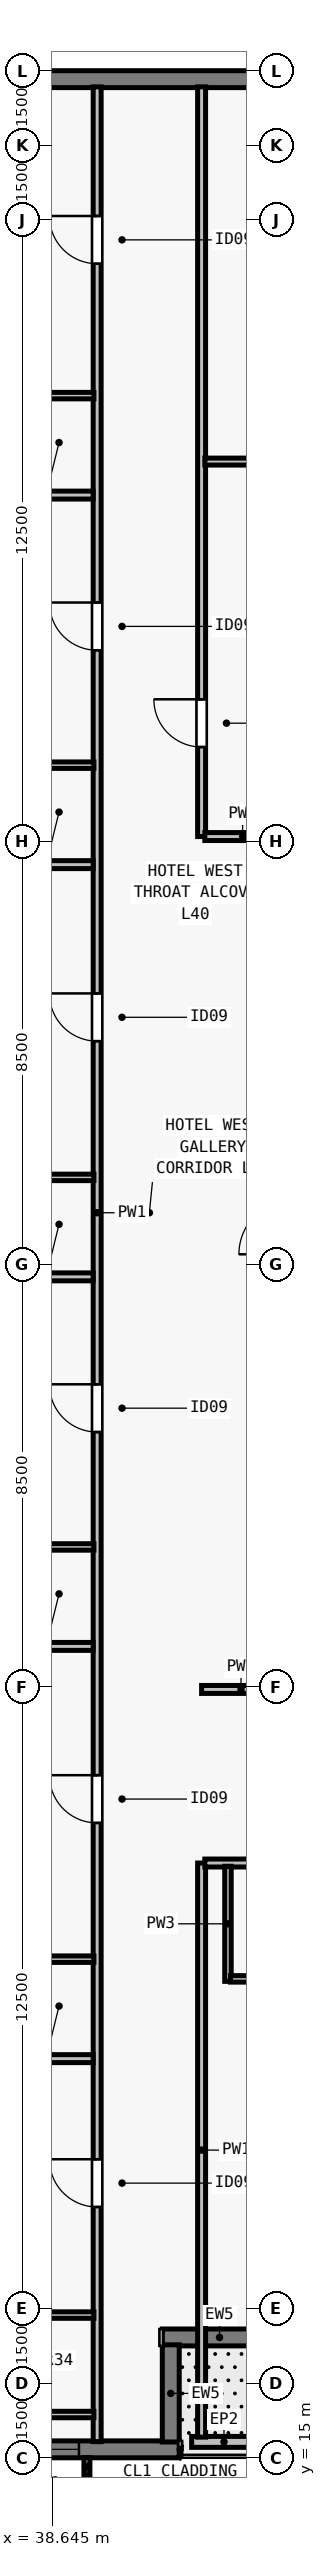
"""IFC4 building model, lengths in metres.
Left out: names, types, materials, properties, quantities, classifications, styles, units other than length and angle.
Written with IfcOpenShell. Run it as: python <this file> out.ifc"""

import sys

from ifc_helpers import new_model, si_unit, direction, frame, frame_2d, origin, place, context, subcontext, project, spatial, rectangle, extrude, element, fill, save


model = new_model("IFC4")
c1 = context("Model", 3, precision=1e-05, world=origin(), true_north=direction((0.0, 1.0)))
c2 = subcontext(c1, "Body", "Model", "MODEL_VIEW")
j1 = project(units=[si_unit("LENGTHUNIT", "METRE"), si_unit("PLANEANGLEUNIT", "RADIAN")], contexts=[c1])
p1 = place(None, origin())
s1 = spatial("IfcSite", under=j1, at=p1, CompositionType="ELEMENT")
p2 = place(p1, origin())
s2 = spatial("IfcBuilding", under=s1, at=p2, CompositionType="ELEMENT")
p3 = place(p2, frame((0.0, 0.0, 148.0)))
s3 = spatial("IfcBuildingStorey", under=s2, at=p3, CompositionType="ELEMENT", Elevation=148.0)
p4 = place(p3, frame((41.2, 15.17, 0.0), z_axis=(0.0, 0.0, 1.0), x_axis=(-1.0, 0.0, 0.0)))
e1 = element("IfcWall", 1, at=p4, inside=s3, PredefinedType="SOLIDWALL", context=c2, shape_type="SweptSolid", body=[
    extrude(rectangle(XDim=8.882, YDim=0.34, at=frame_2d((4.441, 0.0))), origin(), (0.0, 0.0, 1.0), 3.28),
])
p5 = place(p4, frame((2.016, 0.0, 0.8)))
e2 = element("IfcOpeningElement", 2, at=p5, cuts=e1, PredefinedType="OPENING", context=c2, shape_type="SweptSolid", body=[
    extrude(rectangle(XDim=1.35, YDim=1.66, at=frame_2d((0.675, 0.83))), frame((0.0, 0.18, 0.0), z_axis=(0.0, -1.0, 0.0), x_axis=(1.0, 0.0, 0.0)), (0.0, 0.0, 1.0), 0.36),
])
p6 = place(p3, frame((32.0, 62.83, 0.0), z_axis=(0.0, 0.0, 1.0), x_axis=(1.0, 0.0, 0.0)))
e3 = element("IfcWall", 3, at=p6, inside=s3, PredefinedType="SOLIDWALL", context=c2, shape_type="SweptSolid", body=[
    extrude(rectangle(XDim=39.682, YDim=0.34, at=frame_2d((19.841, 0.0))), origin(), (0.0, 0.0, 1.0), 3.28),
])
p7 = place(p6, frame((4.952, 0.0, 0.8)))
e4 = element("IfcOpeningElement", 4, at=p7, cuts=e3, PredefinedType="OPENING", context=c2, shape_type="SweptSolid", body=[
    extrude(rectangle(XDim=1.35, YDim=1.66, at=frame_2d((0.675, 0.83))), frame((0.0, 0.18, 0.0), z_axis=(0.0, -1.0, 0.0), x_axis=(1.0, 0.0, 0.0)), (0.0, 0.0, 1.0), 0.36),
])
p8 = place(p6, frame((12.059, 0.0, 0.8)))
e5 = element("IfcOpeningElement", 5, at=p8, cuts=e3, PredefinedType="OPENING", context=c2, shape_type="SweptSolid", body=[
    extrude(rectangle(XDim=1.35, YDim=1.66, at=frame_2d((0.675, 0.83))), frame((0.0, 0.18, 0.0), z_axis=(0.0, -1.0, 0.0), x_axis=(1.0, 0.0, 0.0)), (0.0, 0.0, 1.0), 0.36),
])
p9 = place(p6, frame((16.262, 0.0, 0.8)))
e6 = element("IfcOpeningElement", 6, at=p9, cuts=e3, PredefinedType="OPENING", context=c2, shape_type="SweptSolid", body=[
    extrude(rectangle(XDim=1.75, YDim=1.66, at=frame_2d((0.875, 0.83))), frame((0.0, 0.18, 0.0), z_axis=(0.0, -1.0, 0.0), x_axis=(1.0, 0.0, 0.0)), (0.0, 0.0, 1.0), 0.36),
])
p10 = place(p6, frame((18.316, 0.0, 0.8)))
e7 = element("IfcOpeningElement", 7, at=p10, cuts=e3, PredefinedType="OPENING", context=c2, shape_type="SweptSolid", body=[
    extrude(rectangle(XDim=1.35, YDim=1.66, at=frame_2d((0.675, 0.83))), frame((0.0, 0.18, 0.0), z_axis=(0.0, -1.0, 0.0), x_axis=(1.0, 0.0, 0.0)), (0.0, 0.0, 1.0), 0.36),
])
p11 = place(p6, frame((22.07, 0.0, 0.8)))
e8 = element("IfcOpeningElement", 8, at=p11, cuts=e3, PredefinedType="OPENING", context=c2, shape_type="SweptSolid", body=[
    extrude(rectangle(XDim=1.75, YDim=1.66, at=frame_2d((0.875, 0.83))), frame((0.0, 0.18, 0.0), z_axis=(0.0, -1.0, 0.0), x_axis=(1.0, 0.0, 0.0)), (0.0, 0.0, 1.0), 0.36),
])
p12 = place(p6, frame((26.273, 0.0, 0.8)))
e9 = element("IfcOpeningElement", 9, at=p12, cuts=e3, PredefinedType="OPENING", context=c2, shape_type="SweptSolid", body=[
    extrude(rectangle(XDim=1.35, YDim=1.66, at=frame_2d((0.675, 0.83))), frame((0.0, 0.18, 0.0), z_axis=(0.0, -1.0, 0.0), x_axis=(1.0, 0.0, 0.0)), (0.0, 0.0, 1.0), 0.36),
])
p13 = place(p6, frame((29.627, 0.0, 0.8)))
e10 = element("IfcOpeningElement", 10, at=p13, cuts=e3, PredefinedType="OPENING", context=c2, shape_type="SweptSolid", body=[
    extrude(rectangle(XDim=1.75, YDim=1.66, at=frame_2d((0.875, 0.83))), frame((0.0, 0.18, 0.0), z_axis=(0.0, -1.0, 0.0), x_axis=(1.0, 0.0, 0.0)), (0.0, 0.0, 1.0), 0.36),
])
p14 = place(p3, frame((46.622, 17.42, 0.0), z_axis=(0.0, 0.0, 1.0), x_axis=(-1.0, 0.0, 0.0)))
e11 = element("IfcWall", 11, at=p14, inside=s3, PredefinedType="SOLIDWALL", context=c2, shape_type="SweptSolid", body=[
    extrude(rectangle(XDim=5.762, YDim=0.34, at=frame_2d((2.881, 0.0))), origin(), (0.0, 0.0, 1.0), 3.28),
])
p15 = place(p14, frame((2.311, 0.0, 0.0)))
e12 = element("IfcOpeningElement", 12, at=p15, cuts=e11, PredefinedType="OPENING", context=c2, shape_type="SweptSolid", body=[
    extrude(rectangle(XDim=1.0, YDim=2.15, at=frame_2d((0.5, 1.075))), frame((0.0, 0.18, 0.0), z_axis=(0.0, -1.0, 0.0), x_axis=(1.0, 0.0, 0.0)), (0.0, 0.0, 1.0), 0.36),
])
p16 = place(p3, frame((41.03, 17.272, 0.0), z_axis=(0.0, 0.0, 1.0), x_axis=(0.0, -1.0, 0.0)))
e13 = element("IfcWall", 13, at=p16, inside=s3, PredefinedType="SOLIDWALL", context=c2, shape_type="SweptSolid", body=[
    extrude(rectangle(XDim=1.954, YDim=0.34, at=frame_2d((0.977, 0.0))), origin(), (0.0, 0.0, 1.0), 3.28),
])
p17 = place(p3, frame((41.45, 15.32, 0.0), z_axis=(0.0, 0.0, 1.0), x_axis=(1.0, 0.0, 0.0)))
e14 = element("IfcWall", 14, at=p17, inside=s3, PredefinedType="PARAPET", context=c2, shape_type="SweptSolid", body=[
    extrude(rectangle(XDim=1.3, YDim=0.22, at=frame_2d((0.65, 0.0))), origin(), (0.0, 0.0, 1.0), 0.55),
])
p18 = place(p3, frame((39.55, 15.325, 0.0), z_axis=(0.0, 0.0, 1.0), x_axis=(0.0, 1.0, 0.0)))
e15 = element("IfcWall", 15, at=p18, inside=s3, PredefinedType="PARTITIONING", context=c2, shape_type="SweptSolid", body=[
    extrude(rectangle(XDim=47.35, YDim=0.16, at=frame_2d((23.675, 0.0))), origin(), (0.0, 0.0, 1.0), 2.555),
])
p19 = place(p18, frame((4.718, 0.0, 0.0)))
e16 = element("IfcOpeningElement", 16, at=p19, cuts=e15, PredefinedType="OPENING", context=c2, shape_type="SweptSolid", body=[
    extrude(rectangle(XDim=0.96, YDim=2.15, at=frame_2d((0.48, 1.075))), frame((0.0, 0.09, 0.0), z_axis=(0.0, -1.0, 0.0), x_axis=(1.0, 0.0, 0.0)), (0.0, 0.0, 1.0), 0.18),
])
p20 = place(p18, frame((12.441, 0.0, 0.0)))
e17 = element("IfcOpeningElement", 17, at=p20, cuts=e15, PredefinedType="OPENING", context=c2, shape_type="SweptSolid", body=[
    extrude(rectangle(XDim=0.96, YDim=2.15, at=frame_2d((0.48, 1.075))), frame((0.0, 0.09, 0.0), z_axis=(0.0, -1.0, 0.0), x_axis=(1.0, 0.0, 0.0)), (0.0, 0.0, 1.0), 0.18),
])
p21 = place(p18, frame((20.301, 0.0, 0.0)))
e18 = element("IfcOpeningElement", 18, at=p21, cuts=e15, PredefinedType="OPENING", context=c2, shape_type="SweptSolid", body=[
    extrude(rectangle(XDim=0.96, YDim=2.15, at=frame_2d((0.48, 1.075))), frame((0.0, 0.09, 0.0), z_axis=(0.0, -1.0, 0.0), x_axis=(1.0, 0.0, 0.0)), (0.0, 0.0, 1.0), 0.18),
])
p22 = place(p18, frame((28.161, 0.0, 0.0)))
e19 = element("IfcOpeningElement", 19, at=p22, cuts=e15, PredefinedType="OPENING", context=c2, shape_type="SweptSolid", body=[
    extrude(rectangle(XDim=0.96, YDim=2.15, at=frame_2d((0.48, 1.075))), frame((0.0, 0.09, 0.0), z_axis=(0.0, -1.0, 0.0), x_axis=(1.0, 0.0, 0.0)), (0.0, 0.0, 1.0), 0.18),
])
p23 = place(p18, frame((36.021, 0.0, 0.0)))
e20 = element("IfcOpeningElement", 20, at=p23, cuts=e15, PredefinedType="OPENING", context=c2, shape_type="SweptSolid", body=[
    extrude(rectangle(XDim=0.96, YDim=2.15, at=frame_2d((0.48, 1.075))), frame((0.0, 0.09, 0.0), z_axis=(0.0, -1.0, 0.0), x_axis=(1.0, 0.0, 0.0)), (0.0, 0.0, 1.0), 0.18),
])
p24 = place(p18, frame((43.793, 0.0, 0.0)))
e21 = element("IfcOpeningElement", 21, at=p24, cuts=e15, PredefinedType="OPENING", context=c2, shape_type="SweptSolid", body=[
    extrude(rectangle(XDim=0.96, YDim=2.15, at=frame_2d((0.48, 1.075))), frame((0.0, 0.09, 0.0), z_axis=(0.0, -1.0, 0.0), x_axis=(1.0, 0.0, 0.0)), (0.0, 0.0, 1.0), 0.18),
])
p25 = place(p3, frame((41.65, 15.415, 0.0), z_axis=(0.0, 0.0, 1.0), x_axis=(0.0, 1.0, 0.0)))
e22 = element("IfcWall", 22, at=p25, inside=s3, PredefinedType="PARTITIONING", context=c2, shape_type="SweptSolid", body=[
    extrude(rectangle(XDim=11.545, YDim=0.16, at=frame_2d((5.772, 0.0))), origin(), (0.0, 0.0, 1.0), 3.28),
])
p26 = place(p3, frame((41.65, 47.6, 0.0), z_axis=(0.0, 0.0, 1.0), x_axis=(0.0, 1.0, 0.0)))
e23 = element("IfcWall", 23, at=p26, inside=s3, PredefinedType="PARTITIONING", context=c2, shape_type="SweptSolid", body=[
    extrude(rectangle(XDim=15.075, YDim=0.16, at=frame_2d((7.538, 0.0))), origin(), (0.0, 0.0, 1.0), 2.555),
])
p27 = place(p26, frame((1.8, 0.0, 0.0)))
e24 = element("IfcOpeningElement", 24, at=p27, cuts=e23, PredefinedType="OPENING", context=c2, shape_type="SweptSolid", body=[
    extrude(rectangle(XDim=0.96, YDim=2.12, at=frame_2d((0.48, 1.06))), frame((0.0, 0.09, 0.0), z_axis=(0.0, -1.0, 0.0), x_axis=(1.0, 0.0, 0.0)), (0.0, 0.0, 1.0), 0.18),
])
p28 = place(p3, frame((41.65, 30.45, 0.0), z_axis=(0.0, 0.0, 1.0), x_axis=(1.0, 0.0, 0.0)))
e25 = element("IfcWall", 25, at=p28, inside=s3, PredefinedType="PARTITIONING", context=c2, shape_type="SweptSolid", body=[
    extrude(rectangle(XDim=1.585, YDim=0.16, at=frame_2d((0.792, 0.0))), origin(), (0.0, 0.0, 1.0), 3.28),
])
p29 = place(p3, frame((41.715, 47.6, 0.0), z_axis=(0.0, 0.0, 1.0), x_axis=(1.0, 0.0, 0.0)))
e26 = element("IfcWall", 26, at=p29, inside=s3, PredefinedType="PARTITIONING", context=c2, shape_type="SweptSolid", body=[
    extrude(rectangle(XDim=1.52, YDim=0.16, at=frame_2d((0.76, 0.0))), origin(), (0.0, 0.0, 1.0), 3.28),
])
p30 = place(p3, frame((41.715, 26.96, 0.0), z_axis=(0.0, 0.0, 1.0), x_axis=(1.0, 0.0, 0.0)))
e27 = element("IfcWall", 27, at=p30, inside=s3, PredefinedType="PARTITIONING", context=c2, shape_type="SweptSolid", body=[
    extrude(rectangle(XDim=22.07, YDim=0.16, at=frame_2d((11.035, 0.0))), origin(), (0.0, 0.0, 1.0), 3.28),
])
p31 = place(p30, frame((6.15, 0.0, 0.0)))
e28 = element("IfcOpeningElement", 28, at=p31, cuts=e27, PredefinedType="OPENING", context=c2, shape_type="SweptSolid", body=[
    extrude(rectangle(XDim=0.96, YDim=2.15, at=frame_2d((0.48, 1.075))), frame((0.0, 0.09, 0.0), z_axis=(0.0, -1.0, 0.0), x_axis=(1.0, 0.0, 0.0)), (0.0, 0.0, 1.0), 0.18),
])
p32 = place(p30, frame((16.945, 0.0, 0.0)))
e29 = element("IfcOpeningElement", 29, at=p32, cuts=e27, PredefinedType="OPENING", context=c2, shape_type="SweptSolid", body=[
    extrude(rectangle(XDim=0.96, YDim=2.15, at=frame_2d((0.48, 1.075))), frame((0.0, 0.09, 0.0), z_axis=(0.0, -1.0, 0.0), x_axis=(1.0, 0.0, 0.0)), (0.0, 0.0, 1.0), 0.18),
])
p33 = place(p3, frame((41.715, 55.14, 0.0), z_axis=(0.0, 0.0, 1.0), x_axis=(1.0, 0.0, 0.0)))
e30 = element("IfcWall", 30, at=p33, inside=s3, PredefinedType="PARTITIONING", context=c2, shape_type="SweptSolid", body=[
    extrude(rectangle(XDim=22.07, YDim=0.14, at=frame_2d((11.035, 0.0))), origin(), (0.0, 0.0, 1.0), 3.28),
])
p34 = place(p33, frame((3.435, 0.0, 0.0)))
e31 = element("IfcOpeningElement", 31, at=p34, cuts=e30, PredefinedType="OPENING", context=c2, shape_type="SweptSolid", body=[
    extrude(rectangle(XDim=0.92, YDim=2.12, at=frame_2d((0.46, 1.06))), frame((0.0, 0.08, 0.0), z_axis=(0.0, -1.0, 0.0), x_axis=(1.0, 0.0, 0.0)), (0.0, 0.0, 1.0), 0.16),
])
p35 = place(p33, frame((14.435, 0.0, 0.0)))
e32 = element("IfcOpeningElement", 32, at=p35, cuts=e30, PredefinedType="OPENING", context=c2, shape_type="SweptSolid", body=[
    extrude(rectangle(XDim=0.92, YDim=2.12, at=frame_2d((0.46, 1.06))), frame((0.0, 0.08, 0.0), z_axis=(0.0, -1.0, 0.0), x_axis=(1.0, 0.0, 0.0)), (0.0, 0.0, 1.0), 0.16),
])
p36 = place(p3, frame((42.18, 24.58, 0.0), z_axis=(0.0, 0.0, 1.0), x_axis=(0.0, 1.0, 0.0)))
e33 = element("IfcWall", 33, at=p36, inside=s3, PredefinedType="PLUMBINGWALL", context=c2, shape_type="SweptSolid", body=[
    extrude(rectangle(XDim=2.315, YDim=0.13, at=frame_2d((1.157, 0.0))), origin(), (0.0, 0.0, 1.0), 3.28),
])
p37 = place(p3, frame((42.23, 24.63, 0.0), z_axis=(0.0, 0.0, 1.0), x_axis=(1.0, 0.0, 0.0)))
e34 = element("IfcWall", 34, at=p37, inside=s3, PredefinedType="PLUMBINGWALL", context=c2, shape_type="SweptSolid", body=[
    extrude(rectangle(XDim=1.9, YDim=0.13, at=frame_2d((0.95, 0.0))), origin(), (0.0, 0.0, 1.0), 3.28),
])
p38 = place(p37, frame((0.54, 0.0, 0.0)))
e35 = element("IfcOpeningElement", 35, at=p38, cuts=e34, PredefinedType="OPENING", context=c2, shape_type="SweptSolid", body=[
    extrude(rectangle(XDim=0.82, YDim=2.1, at=frame_2d((0.41, 1.05))), frame((0.0, 0.075, 0.0), z_axis=(0.0, -1.0, 0.0), x_axis=(1.0, 0.0, 0.0)), (0.0, 0.0, 1.0), 0.15),
])
for number, where, z_axis, x_axis in (
    (36, (37.17, 15.87, 0.0), (0.0, 0.0, 1.0), (1.0, 0.0, 0.0)),
    (37, (37.17, 17.87, 0.0), (0.0, 0.0, 1.0), (1.0, 0.0, 0.0)),
):
    element("IfcWall", number, at=place(p3, frame(where, z_axis=z_axis, x_axis=x_axis)), inside=s3, PredefinedType="PLUMBINGWALL", context=c2, shape_type="SweptSolid", body=[
        extrude(rectangle(XDim=2.315, YDim=0.13, at=frame_2d((1.158, 0.0))), origin(), (0.0, 0.0, 1.0), 3.28),
    ])
p39 = place(p3, frame((28.325, 23.027, 0.0), z_axis=(0.0, 0.0, 1.0), x_axis=(1.0, 0.0, 0.0)))
e38 = element("IfcWall", 38, at=p39, inside=s3, PredefinedType="PARTITIONING", context=c2, shape_type="SweptSolid", body=[
    extrude(rectangle(XDim=11.145, YDim=0.16, at=frame_2d((5.573, 0.0))), origin(), (0.0, 0.0, 1.0), 2.896),
])
p40 = place(p3, frame((37.17, 25.027, 0.0), z_axis=(0.0, 0.0, 1.0), x_axis=(1.0, 0.0, 0.0)))
e39 = element("IfcWall", 39, at=p40, inside=s3, PredefinedType="PLUMBINGWALL", context=c2, shape_type="SweptSolid", body=[
    extrude(rectangle(XDim=2.315, YDim=0.13, at=frame_2d((1.158, 0.0))), origin(), (0.0, 0.0, 1.0), 3.28),
])
p41 = place(p3, frame((28.325, 31.315, 0.0), z_axis=(0.0, 0.0, 1.0), x_axis=(1.0, 0.0, 0.0)))
e40 = element("IfcWall", 40, at=p41, inside=s3, PredefinedType="PARTITIONING", context=c2, shape_type="SweptSolid", body=[
    extrude(rectangle(XDim=11.145, YDim=0.16, at=frame_2d((5.573, 0.0))), origin(), (0.0, 0.0, 1.0), 3.28),
])
p42 = place(p3, frame((37.17, 33.315, 0.0), z_axis=(0.0, 0.0, 1.0), x_axis=(1.0, 0.0, 0.0)))
e41 = element("IfcWall", 41, at=p42, inside=s3, PredefinedType="PLUMBINGWALL", context=c2, shape_type="SweptSolid", body=[
    extrude(rectangle(XDim=2.315, YDim=0.13, at=frame_2d((1.158, 0.0))), origin(), (0.0, 0.0, 1.0), 3.28),
])
p43 = place(p3, frame((28.325, 38.747, 0.0), z_axis=(0.0, 0.0, 1.0), x_axis=(1.0, 0.0, 0.0)))
e42 = element("IfcWall", 42, at=p43, inside=s3, PredefinedType="PARTITIONING", context=c2, shape_type="SweptSolid", body=[
    extrude(rectangle(XDim=11.145, YDim=0.16, at=frame_2d((5.573, 0.0))), origin(), (0.0, 0.0, 1.0), 2.896),
])
p44 = place(p3, frame((37.17, 40.747, 0.0), z_axis=(0.0, 0.0, 1.0), x_axis=(1.0, 0.0, 0.0)))
e43 = element("IfcWall", 43, at=p44, inside=s3, PredefinedType="PLUMBINGWALL", context=c2, shape_type="SweptSolid", body=[
    extrude(rectangle(XDim=2.315, YDim=0.13, at=frame_2d((1.158, 0.0))), origin(), (0.0, 0.0, 1.0), 3.28),
])
p45 = place(p3, frame((28.325, 47.035, 0.0), z_axis=(0.0, 0.0, 1.0), x_axis=(1.0, 0.0, 0.0)))
e44 = element("IfcWall", 44, at=p45, inside=s3, PredefinedType="PARTITIONING", context=c2, shape_type="SweptSolid", body=[
    extrude(rectangle(XDim=11.145, YDim=0.16, at=frame_2d((5.573, 0.0))), origin(), (0.0, 0.0, 1.0), 3.28),
])
p46 = place(p3, frame((37.17, 49.035, 0.0), z_axis=(0.0, 0.0, 1.0), x_axis=(1.0, 0.0, 0.0)))
e45 = element("IfcWall", 45, at=p46, inside=s3, PredefinedType="PLUMBINGWALL", context=c2, shape_type="SweptSolid", body=[
    extrude(rectangle(XDim=2.315, YDim=0.13, at=frame_2d((1.158, 0.0))), origin(), (0.0, 0.0, 1.0), 3.28),
])
p47 = place(p3, frame((28.325, 54.467, 0.0), z_axis=(0.0, 0.0, 1.0), x_axis=(1.0, 0.0, 0.0)))
e46 = element("IfcWall", 46, at=p47, inside=s3, PredefinedType="PARTITIONING", context=c2, shape_type="SweptSolid", body=[
    extrude(rectangle(XDim=11.145, YDim=0.16, at=frame_2d((5.573, 0.0))), origin(), (0.0, 0.0, 1.0), 2.896),
])
p48 = place(p3, frame((37.17, 56.467, 0.0), z_axis=(0.0, 0.0, 1.0), x_axis=(1.0, 0.0, 0.0)))
e47 = element("IfcWall", 47, at=p48, inside=s3, PredefinedType="PLUMBINGWALL", context=c2, shape_type="SweptSolid", body=[
    extrude(rectangle(XDim=2.315, YDim=0.13, at=frame_2d((1.158, 0.0))), origin(), (0.0, 0.0, 1.0), 3.28),
])
p49 = place(p5, origin())
e48 = element("IfcWindow", 48, at=p49, inside=s3, PartitioningType="SINGLE_PANEL", PredefinedType="WINDOW", context=c2, shape_type="SweptSolid", body=[
    extrude(rectangle(XDim=1.35, YDim=1.66, at=frame_2d((0.675, 0.83))), frame((0.0, -0.05, 0.0), z_axis=(0.0, -1.0, 0.0), x_axis=(1.0, 0.0, 0.0)), (0.0, 0.0, 1.0), 0.06),
])
fill(e2, e48)
p50 = place(p27, origin())
e49 = element("IfcDoor", 49, at=p50, inside=s3, OperationType="SINGLE_SWING_RIGHT", PredefinedType="DOOR", context=c2, shape_type="SweptSolid", body=[
    extrude(rectangle(XDim=0.96, YDim=2.12, at=frame_2d((0.48, 1.06))), frame((0.0, 0.025, 0.0), z_axis=(0.0, -1.0, 0.0), x_axis=(1.0, 0.0, 0.0)), (0.0, 0.0, 1.0), 0.05),
])
fill(e24, e49)
p51 = place(p19, origin())
e50 = element("IfcDoor", 50, at=p51, inside=s3, OperationType="SINGLE_SWING_RIGHT", PredefinedType="DOOR", context=c2, shape_type="SweptSolid", body=[
    extrude(rectangle(XDim=0.96, YDim=2.15, at=frame_2d((0.48, 1.075))), frame((0.0, 0.025, 0.0), z_axis=(0.0, -1.0, 0.0), x_axis=(1.0, 0.0, 0.0)), (0.0, 0.0, 1.0), 0.05),
])
fill(e16, e50)
p52 = place(p20, origin())
e51 = element("IfcDoor", 51, at=p52, inside=s3, OperationType="SINGLE_SWING_RIGHT", PredefinedType="DOOR", context=c2, shape_type="SweptSolid", body=[
    extrude(rectangle(XDim=0.96, YDim=2.15, at=frame_2d((0.48, 1.075))), frame((0.0, 0.025, 0.0), z_axis=(0.0, -1.0, 0.0), x_axis=(1.0, 0.0, 0.0)), (0.0, 0.0, 1.0), 0.05),
])
fill(e17, e51)
p53 = place(p21, origin())
e52 = element("IfcDoor", 52, at=p53, inside=s3, OperationType="SINGLE_SWING_RIGHT", PredefinedType="DOOR", context=c2, shape_type="SweptSolid", body=[
    extrude(rectangle(XDim=0.96, YDim=2.15, at=frame_2d((0.48, 1.075))), frame((0.0, 0.025, 0.0), z_axis=(0.0, -1.0, 0.0), x_axis=(1.0, 0.0, 0.0)), (0.0, 0.0, 1.0), 0.05),
])
fill(e18, e52)
p54 = place(p22, origin())
e53 = element("IfcDoor", 53, at=p54, inside=s3, OperationType="SINGLE_SWING_RIGHT", PredefinedType="DOOR", context=c2, shape_type="SweptSolid", body=[
    extrude(rectangle(XDim=0.96, YDim=2.15, at=frame_2d((0.48, 1.075))), frame((0.0, 0.025, 0.0), z_axis=(0.0, -1.0, 0.0), x_axis=(1.0, 0.0, 0.0)), (0.0, 0.0, 1.0), 0.05),
])
fill(e19, e53)
p55 = place(p23, origin())
e54 = element("IfcDoor", 54, at=p55, inside=s3, OperationType="SINGLE_SWING_RIGHT", PredefinedType="DOOR", context=c2, shape_type="SweptSolid", body=[
    extrude(rectangle(XDim=0.96, YDim=2.15, at=frame_2d((0.48, 1.075))), frame((0.0, 0.025, 0.0), z_axis=(0.0, -1.0, 0.0), x_axis=(1.0, 0.0, 0.0)), (0.0, 0.0, 1.0), 0.05),
])
fill(e20, e54)
p56 = place(p24, origin())
e55 = element("IfcDoor", 55, at=p56, inside=s3, OperationType="SINGLE_SWING_RIGHT", PredefinedType="DOOR", context=c2, shape_type="SweptSolid", body=[
    extrude(rectangle(XDim=0.96, YDim=2.15, at=frame_2d((0.48, 1.075))), frame((0.0, 0.025, 0.0), z_axis=(0.0, -1.0, 0.0), x_axis=(1.0, 0.0, 0.0)), (0.0, 0.0, 1.0), 0.05),
])
fill(e21, e55)
save(model, sys.argv[1])
